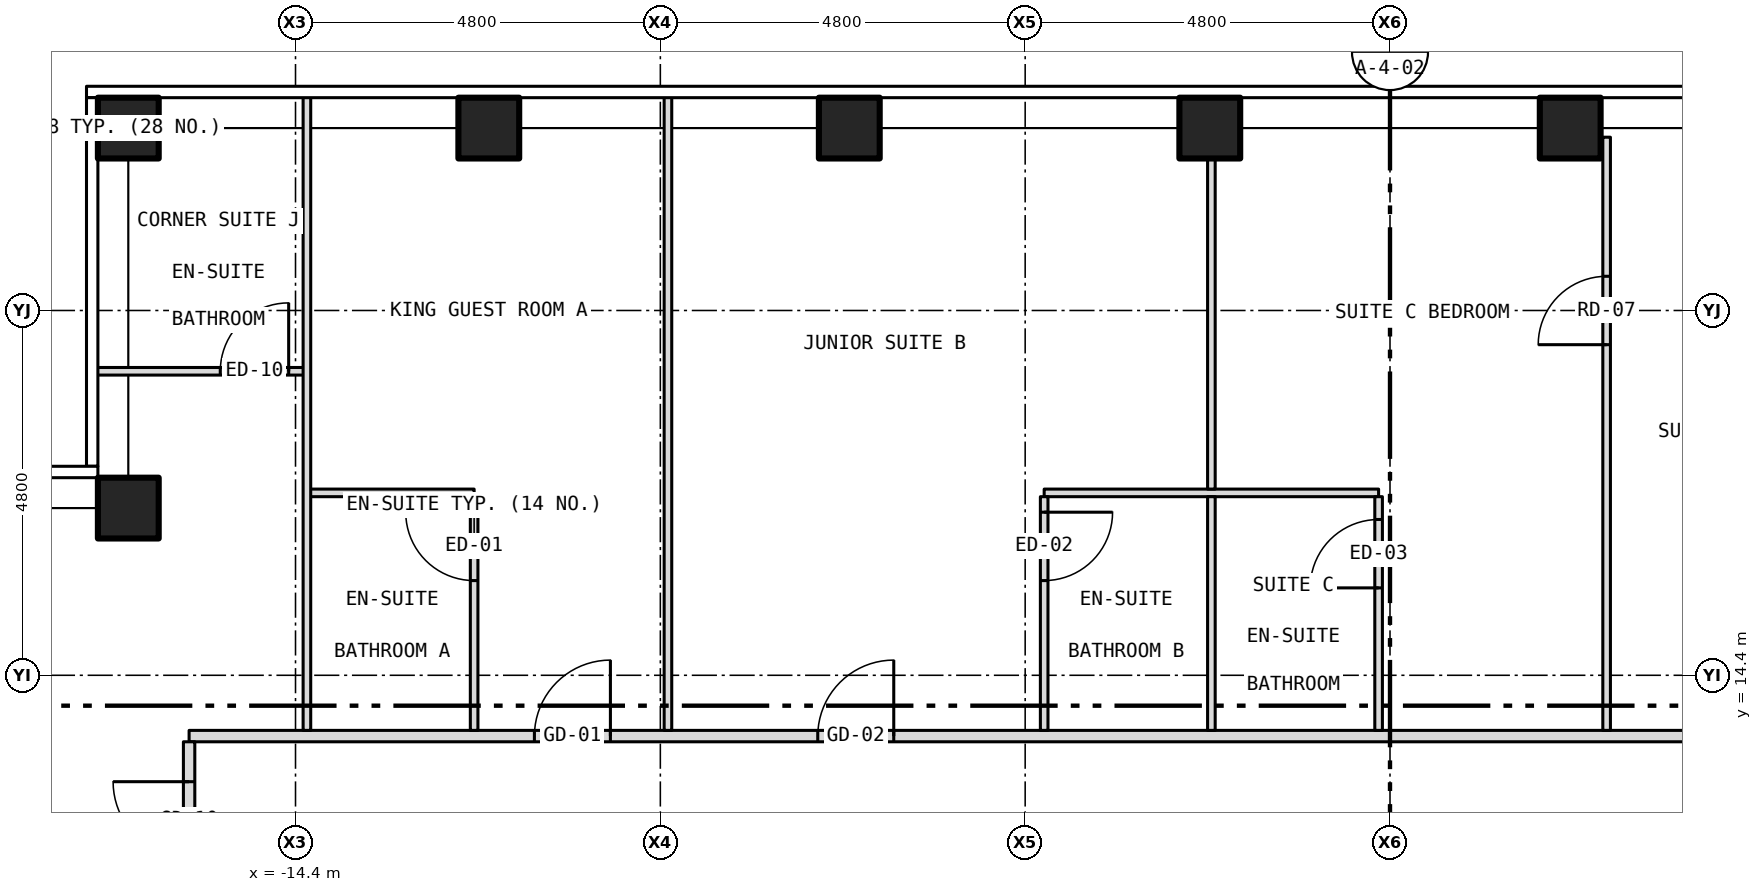
"""IFC4 building model, lengths in metres.
Left out: names, types, materials, properties, quantities, classifications, styles, units other than length and angle.
Written with IfcOpenShell. Run it as: python <this file> out.ifc"""

import sys

from ifc_helpers import new_model, si_unit, direction, frame, frame_2d, origin, origin_2d, place, context, subcontext, project, spatial, rectangle, hollow_rectangle, extrude, element, fill, save


model = new_model("IFC4")
c1 = context("Model", 3, precision=1e-05, world=origin(), true_north=direction((0.0, 1.0)))
c2 = subcontext(c1, "Body", "Model", "MODEL_VIEW")
j1 = project(units=[si_unit("LENGTHUNIT", "METRE"), si_unit("PLANEANGLEUNIT", "RADIAN")], contexts=[c1])
p1 = place(None, origin())
s1 = spatial("IfcSite", under=j1, at=p1, CompositionType="ELEMENT")
p2 = place(p1, origin())
s2 = spatial("IfcBuilding", under=s1, at=p2, CompositionType="ELEMENT")
p3 = place(p2, frame((0.0, 0.0, 172.5)))
s3 = spatial("IfcBuildingStorey", under=s2, at=p3, CompositionType="ELEMENT", Elevation=172.5)
for number, where, z_axis, x_axis in (
    (1, (-16.6, 21.6, -0.15), (0.0, 0.0, 1.0), (1.0, 0.0, 0.0)),
    (2, (-11.857, 21.6, -0.15), (0.0, 0.0, 1.0), (1.0, 0.0, 0.0)),
    (3, (-7.114, 21.6, -0.15), (0.0, 0.0, 1.0), (1.0, 0.0, 0.0)),
    (4, (-2.371, 21.6, -0.15), (0.0, 0.0, 1.0), (1.0, 0.0, 0.0)),
    (5, (2.371, 21.6, -0.15), (0.0, 0.0, 1.0), (1.0, 0.0, 0.0)),
    (6, (-16.6, 16.6, -0.15), (0.0, 0.0, 1.0), (1.0, 0.0, 0.0)),
):
    element("IfcColumn", number, at=place(p3, frame(where, z_axis=z_axis, x_axis=x_axis)), inside=s3, PredefinedType="COLUMN", context=c2, shape_type="SweptSolid", body=[
        extrude(hollow_rectangle(XDim=0.8, YDim=0.8, WallThickness=0.045, at=origin_2d()), origin(), (0.0, 0.0, 1.0), 3.5),
    ])
p4 = place(p3, frame((-15.8, 13.6, 0.0), z_axis=(0.0, 0.0, 1.0), x_axis=(1.0, 0.0, 0.0)))
e7 = element("IfcWall", 7, at=p4, inside=s3, PredefinedType="PARTITIONING", context=c2, shape_type="SweptSolid", body=[
    extrude(rectangle(XDim=31.6, YDim=0.15, at=frame_2d((15.8, 0.0))), origin(), (0.0, 0.0, 1.0), 3.35),
])
p5 = place(p4, frame((4.543, 0.0, 0.0)))
e8 = element("IfcOpeningElement", 8, at=p5, cuts=e7, PredefinedType="OPENING", context=c2, shape_type="SweptSolid", body=[
    extrude(rectangle(XDim=1.0, YDim=2.1, at=frame_2d((0.5, 1.05))), frame((0.0, 0.087, 0.0), z_axis=(0.0, -1.0, 0.0), x_axis=(1.0, 0.0, 0.0)), (0.0, 0.0, 1.0), 0.174),
])
p6 = place(p4, frame((8.271, 0.0, 0.0)))
e9 = element("IfcOpeningElement", 9, at=p6, cuts=e7, PredefinedType="OPENING", context=c2, shape_type="SweptSolid", body=[
    extrude(rectangle(XDim=1.0, YDim=2.1, at=frame_2d((0.5, 1.05))), frame((0.0, 0.087, 0.0), z_axis=(0.0, -1.0, 0.0), x_axis=(1.0, 0.0, 0.0)), (0.0, 0.0, 1.0), 0.174),
])
p7 = place(p4, frame((20.28, 0.0, 0.0)))
e10 = element("IfcOpeningElement", 10, at=p7, cuts=e7, PredefinedType="OPENING", context=c2, shape_type="SweptSolid", body=[
    extrude(rectangle(XDim=1.0, YDim=2.1, at=frame_2d((0.5, 1.05))), frame((0.0, 0.087, 0.0), z_axis=(0.0, -1.0, 0.0), x_axis=(1.0, 0.0, 0.0)), (0.0, 0.0, 1.0), 0.174),
])
p8 = place(p4, frame((27.072, 0.0, 0.0)))
e11 = element("IfcOpeningElement", 11, at=p8, cuts=e7, PredefinedType="OPENING", context=c2, shape_type="SweptSolid", body=[
    extrude(rectangle(XDim=1.0, YDim=2.1, at=frame_2d((0.5, 1.05))), frame((0.0, 0.087, 0.0), z_axis=(0.0, -1.0, 0.0), x_axis=(1.0, 0.0, 0.0)), (0.0, 0.0, 1.0), 0.174),
])
p9 = place(p3, frame((-14.25, 16.8, 0.0), z_axis=(0.0, 0.0, 1.0), x_axis=(1.0, 0.0, 0.0)))
e12 = element("IfcWall", 12, at=p9, inside=s3, PredefinedType="PARTITIONING", context=c2, shape_type="SweptSolid", body=[
    extrude(rectangle(XDim=2.2, YDim=0.1, at=frame_2d((1.1, 0.0))), origin(), (0.0, 0.0, 1.0), 3.35),
])
p10 = place(p3, frame((-4.55, 16.8, 0.0), z_axis=(0.0, 0.0, 1.0), x_axis=(1.0, 0.0, 0.0)))
e13 = element("IfcWall", 13, at=p10, inside=s3, PredefinedType="PARTITIONING", context=c2, shape_type="SweptSolid", body=[
    extrude(rectangle(XDim=4.4, YDim=0.1, at=frame_2d((2.2, 0.0))), origin(), (0.0, 0.0, 1.0), 3.35),
])
p11 = place(p3, frame((-17.03, 18.4, 0.0), z_axis=(0.0, 0.0, 1.0), x_axis=(1.0, 0.0, 0.0)))
e14 = element("IfcWall", 14, at=p11, inside=s3, PredefinedType="PARTITIONING", context=c2, shape_type="SweptSolid", body=[
    extrude(rectangle(XDim=2.78, YDim=0.1, at=frame_2d((1.39, 0.0))), origin(), (0.0, 0.0, 1.0), 3.35),
])
p12 = place(p11, frame((1.64, 0.0, 0.0)))
e15 = element("IfcOpeningElement", 15, at=p12, cuts=e14, PredefinedType="OPENING", context=c2, shape_type="SweptSolid", body=[
    extrude(rectangle(XDim=0.9, YDim=2.1, at=frame_2d((0.45, 1.05))), frame((0.0, 0.062, 0.0), z_axis=(0.0, -1.0, 0.0), x_axis=(1.0, 0.0, 0.0)), (0.0, 0.0, 1.0), 0.124),
])
p13 = place(p3, frame((-15.8, 10.92, 0.0), z_axis=(0.0, 0.0, 1.0), x_axis=(0.0, 1.0, 0.0)))
e16 = element("IfcWall", 16, at=p13, inside=s3, PredefinedType="PARTITIONING", context=c2, shape_type="SweptSolid", body=[
    extrude(rectangle(XDim=2.605, YDim=0.15, at=frame_2d((1.302, 0.0))), origin(), (0.0, 0.0, 1.0), 3.35),
])
p14 = place(p13, frame((1.08, 0.0, 0.0)))
e17 = element("IfcOpeningElement", 17, at=p14, cuts=e16, PredefinedType="OPENING", context=c2, shape_type="SweptSolid", body=[
    extrude(rectangle(XDim=1.0, YDim=2.1, at=frame_2d((0.5, 1.05))), frame((0.0, 0.087, 0.0), z_axis=(0.0, -1.0, 0.0), x_axis=(1.0, 0.0, 0.0)), (0.0, 0.0, 1.0), 0.174),
])
p15 = place(p3, frame((-14.25, 13.675, 0.0), z_axis=(0.0, 0.0, 1.0), x_axis=(0.0, 1.0, 0.0)))
e18 = element("IfcWall", 18, at=p15, inside=s3, PredefinedType="PARTITIONING", context=c2, shape_type="SweptSolid", body=[
    extrude(rectangle(XDim=8.355, YDim=0.1, at=frame_2d((4.177, 0.0))), origin(), (0.0, 0.0, 1.0), 2.817),
])
p16 = place(p3, frame((-12.05, 13.675, 0.0), z_axis=(0.0, 0.0, 1.0), x_axis=(0.0, 1.0, 0.0)))
e19 = element("IfcWall", 19, at=p16, inside=s3, PredefinedType="PARTITIONING", context=c2, shape_type="SweptSolid", body=[
    extrude(rectangle(XDim=3.075, YDim=0.1, at=frame_2d((1.538, 0.0))), origin(), (0.0, 0.0, 1.0), 3.35),
])
p17 = place(p16, frame((1.971, 0.0, 0.0)))
e20 = element("IfcOpeningElement", 20, at=p17, cuts=e19, PredefinedType="OPENING", context=c2, shape_type="SweptSolid", body=[
    extrude(rectangle(XDim=0.9, YDim=2.1, at=frame_2d((0.45, 1.05))), frame((0.0, 0.062, 0.0), z_axis=(0.0, -1.0, 0.0), x_axis=(1.0, 0.0, 0.0)), (0.0, 0.0, 1.0), 0.124),
])
p18 = place(p3, frame((-9.5, 13.675, 0.0), z_axis=(0.0, 0.0, 1.0), x_axis=(0.0, 1.0, 0.0)))
e21 = element("IfcWall", 21, at=p18, inside=s3, PredefinedType="PARTITIONING", context=c2, shape_type="SweptSolid", body=[
    extrude(rectangle(XDim=8.355, YDim=0.1, at=frame_2d((4.177, 0.0))), origin(), (0.0, 0.0, 1.0), 2.728),
])
p19 = place(p3, frame((-4.55, 13.675, 0.0), z_axis=(0.0, 0.0, 1.0), x_axis=(0.0, 1.0, 0.0)))
e22 = element("IfcWall", 22, at=p19, inside=s3, PredefinedType="PARTITIONING", context=c2, shape_type="SweptSolid", body=[
    extrude(rectangle(XDim=3.075, YDim=0.1, at=frame_2d((1.538, 0.0))), origin(), (0.0, 0.0, 1.0), 3.35),
])
p20 = place(p19, frame((1.971, 0.0, 0.0)))
e23 = element("IfcOpeningElement", 23, at=p20, cuts=e22, PredefinedType="OPENING", context=c2, shape_type="SweptSolid", body=[
    extrude(rectangle(XDim=0.9, YDim=2.1, at=frame_2d((0.45, 1.05))), frame((0.0, 0.062, 0.0), z_axis=(0.0, -1.0, 0.0), x_axis=(1.0, 0.0, 0.0)), (0.0, 0.0, 1.0), 0.124),
])
p21 = place(p3, frame((-2.35, 13.675, 0.0), z_axis=(0.0, 0.0, 1.0), x_axis=(0.0, 1.0, 0.0)))
e24 = element("IfcWall", 24, at=p21, inside=s3, PredefinedType="PARTITIONING", context=c2, shape_type="SweptSolid", body=[
    extrude(rectangle(XDim=3.075, YDim=0.1, at=frame_2d((1.538, 0.0))), origin(), (0.0, 0.0, 1.0), 3.35),
])
p22 = place(p3, frame((-2.35, 16.85, 0.0), z_axis=(0.0, 0.0, 1.0), x_axis=(0.0, 1.0, 0.0)))
e25 = element("IfcWall", 25, at=p22, inside=s3, PredefinedType="PARTITIONING", context=c2, shape_type="SweptSolid", body=[
    extrude(rectangle(XDim=4.63, YDim=0.1, at=frame_2d((2.315, 0.0))), origin(), (0.0, 0.0, 1.0), 3.35),
])
p23 = place(p3, frame((-0.15, 13.675, 0.0), z_axis=(0.0, 0.0, 1.0), x_axis=(0.0, 1.0, 0.0)))
e26 = element("IfcWall", 26, at=p23, inside=s3, PredefinedType="PARTITIONING", context=c2, shape_type="SweptSolid", body=[
    extrude(rectangle(XDim=3.075, YDim=0.1, at=frame_2d((1.538, 0.0))), origin(), (0.0, 0.0, 1.0), 2.728),
])
p24 = place(p23, frame((1.875, 0.0, 0.0)))
e27 = element("IfcOpeningElement", 27, at=p24, cuts=e26, PredefinedType="OPENING", context=c2, shape_type="SweptSolid", body=[
    extrude(rectangle(XDim=0.9, YDim=2.1, at=frame_2d((0.45, 1.05))), frame((0.0, 0.062, 0.0), z_axis=(0.0, -1.0, 0.0), x_axis=(1.0, 0.0, 0.0)), (0.0, 0.0, 1.0), 0.124),
])
p25 = place(p3, frame((2.85, 13.675, 0.0), z_axis=(0.0, 0.0, 1.0), x_axis=(0.0, 1.0, 0.0)))
e28 = element("IfcWall", 28, at=p25, inside=s3, PredefinedType="PARTITIONING", context=c2, shape_type="SweptSolid", body=[
    extrude(rectangle(XDim=7.805, YDim=0.1, at=frame_2d((3.902, 0.0))), origin(), (0.0, 0.0, 1.0), 3.35),
])
p26 = place(p25, frame((5.075, 0.0, 0.0)))
e29 = element("IfcOpeningElement", 29, at=p26, cuts=e28, PredefinedType="OPENING", context=c2, shape_type="SweptSolid", body=[
    extrude(rectangle(XDim=0.9, YDim=2.1, at=frame_2d((0.45, 1.05))), frame((0.0, 0.062, 0.0), z_axis=(0.0, -1.0, 0.0), x_axis=(1.0, 0.0, 0.0)), (0.0, 0.0, 1.0), 0.124),
])
p27 = place(p5, origin())
e30 = element("IfcDoor", 30, at=p27, inside=s3, OperationType="SINGLE_SWING_RIGHT", PredefinedType="DOOR", context=c2, shape_type="SweptSolid", body=[
    extrude(rectangle(XDim=1.0, YDim=2.1, at=frame_2d((0.5, 1.05))), frame((0.0, 0.025, 0.0), z_axis=(0.0, -1.0, 0.0), x_axis=(1.0, 0.0, 0.0)), (0.0, 0.0, 1.0), 0.05),
])
fill(e8, e30)
p28 = place(p17, origin())
e31 = element("IfcDoor", 31, at=p28, inside=s3, OperationType="SINGLE_SWING_RIGHT", PredefinedType="DOOR", context=c2, shape_type="SweptSolid", body=[
    extrude(rectangle(XDim=0.9, YDim=2.1, at=frame_2d((0.45, 1.05))), frame((0.0, 0.025, 0.0), z_axis=(0.0, -1.0, 0.0), x_axis=(1.0, 0.0, 0.0)), (0.0, 0.0, 1.0), 0.05),
])
fill(e20, e31)
p29 = place(p6, origin())
e32 = element("IfcDoor", 32, at=p29, inside=s3, OperationType="SINGLE_SWING_RIGHT", PredefinedType="DOOR", context=c2, shape_type="SweptSolid", body=[
    extrude(rectangle(XDim=1.0, YDim=2.1, at=frame_2d((0.5, 1.05))), frame((0.0, 0.025, 0.0), z_axis=(0.0, -1.0, 0.0), x_axis=(1.0, 0.0, 0.0)), (0.0, 0.0, 1.0), 0.05),
])
fill(e9, e32)
p30 = place(p20, origin())
e33 = element("IfcDoor", 33, at=p30, inside=s3, OperationType="SINGLE_SWING_RIGHT", PredefinedType="DOOR", context=c2, shape_type="SweptSolid", body=[
    extrude(rectangle(XDim=0.9, YDim=2.1, at=frame_2d((0.45, 1.05))), frame((0.0, 0.025, 0.0), z_axis=(0.0, -1.0, 0.0), x_axis=(1.0, 0.0, 0.0)), (0.0, 0.0, 1.0), 0.05),
])
fill(e23, e33)
p31 = place(p26, origin())
e34 = element("IfcDoor", 34, at=p31, inside=s3, OperationType="SINGLE_SWING_LEFT", PredefinedType="DOOR", context=c2, shape_type="SweptSolid", body=[
    extrude(rectangle(XDim=0.9, YDim=2.1, at=frame_2d((0.45, 1.05))), frame((0.0, 0.025, 0.0), z_axis=(0.0, -1.0, 0.0), x_axis=(1.0, 0.0, 0.0)), (0.0, 0.0, 1.0), 0.05),
])
fill(e29, e34)
p32 = place(p24, origin())
e35 = element("IfcDoor", 35, at=p32, inside=s3, OperationType="SINGLE_SWING_LEFT", PredefinedType="DOOR", context=c2, shape_type="SweptSolid", body=[
    extrude(rectangle(XDim=0.9, YDim=2.1, at=frame_2d((0.45, 1.05))), frame((0.0, 0.025, 0.0), z_axis=(0.0, -1.0, 0.0), x_axis=(1.0, 0.0, 0.0)), (0.0, 0.0, 1.0), 0.05),
])
fill(e27, e35)
p33 = place(p12, origin())
e36 = element("IfcDoor", 36, at=p33, inside=s3, OperationType="SINGLE_SWING_RIGHT", PredefinedType="DOOR", context=c2, shape_type="SweptSolid", body=[
    extrude(rectangle(XDim=0.9, YDim=2.1, at=frame_2d((0.45, 1.05))), frame((0.0, 0.025, 0.0), z_axis=(0.0, -1.0, 0.0), x_axis=(1.0, 0.0, 0.0)), (0.0, 0.0, 1.0), 0.05),
])
fill(e15, e36)
p34 = place(p14, origin())
e37 = element("IfcDoor", 37, at=p34, inside=s3, OperationType="SINGLE_SWING_RIGHT", PredefinedType="DOOR", context=c2, shape_type="SweptSolid", body=[
    extrude(rectangle(XDim=1.0, YDim=2.1, at=frame_2d((0.5, 1.05))), frame((0.0, 0.025, 0.0), z_axis=(0.0, -1.0, 0.0), x_axis=(1.0, 0.0, 0.0)), (0.0, 0.0, 1.0), 0.05),
])
fill(e17, e37)
save(model, sys.argv[1])
